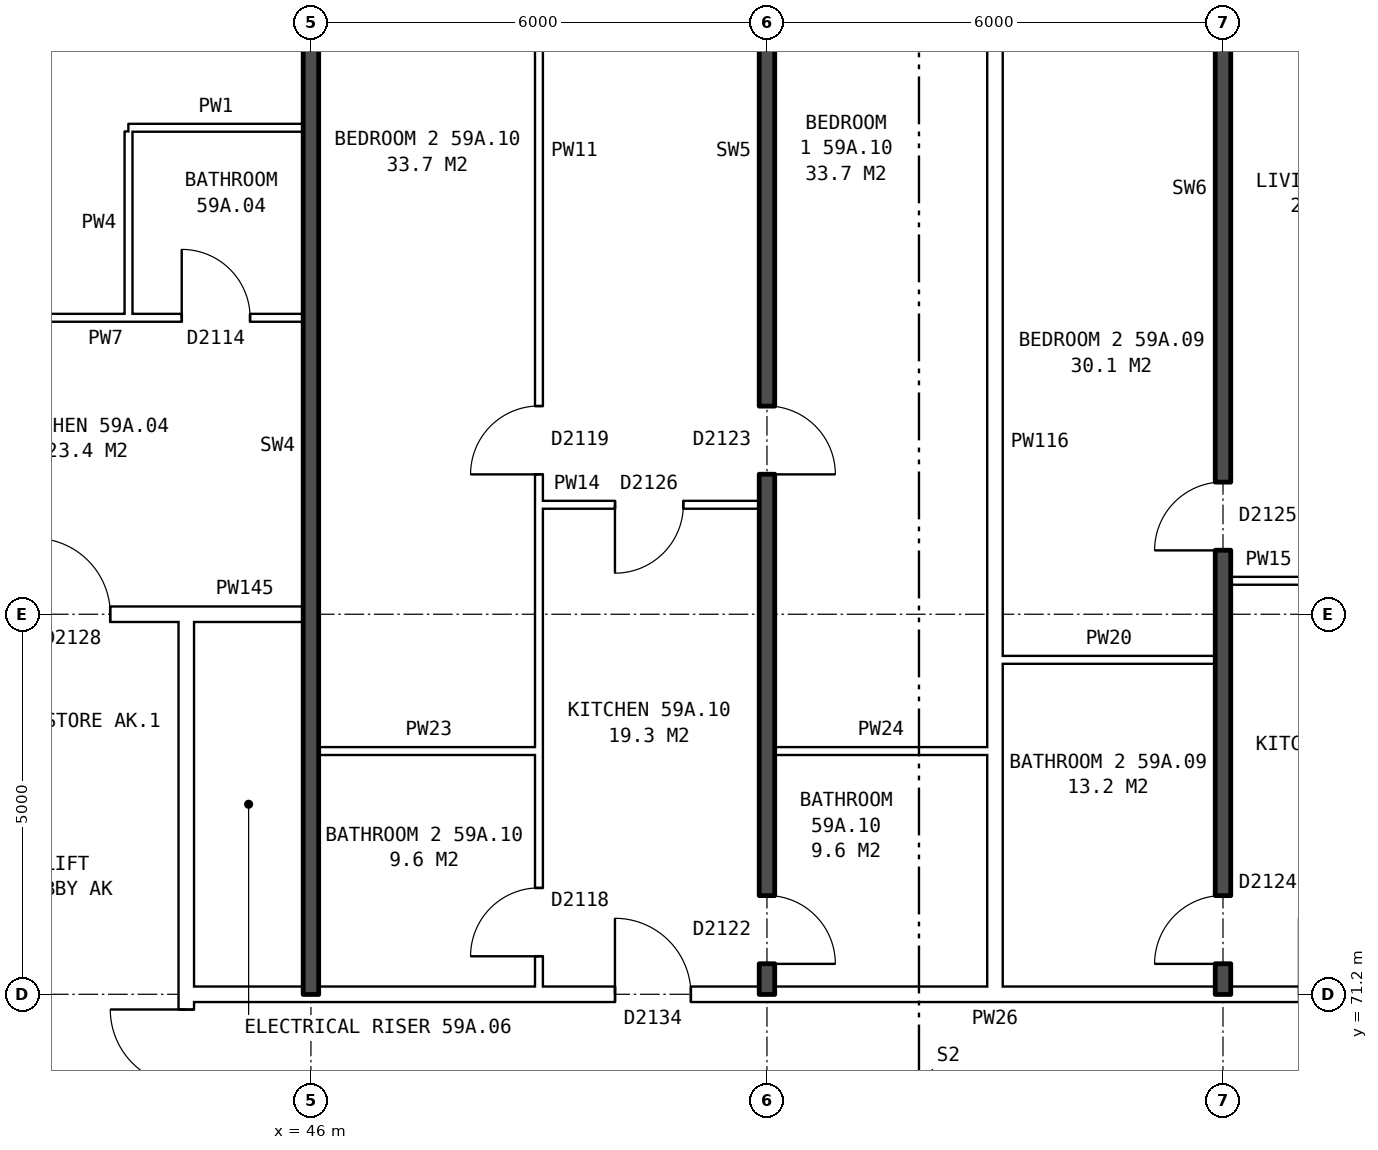
"""IFC4 building model, lengths in metres.
Left out: names, types, materials, properties, quantities, classifications, styles, units other than length and angle.
Written with IfcOpenShell. Run it as: python <this file> out.ifc"""

import sys

from ifc_helpers import new_model, si_unit, direction, frame, frame_2d, origin, place, context, subcontext, project, spatial, rectangle, extrude, element, fill, save


model = new_model("IFC4")
c1 = context("Model", 3, precision=1e-05, world=origin(), true_north=direction((0.0, 1.0)))
c2 = subcontext(c1, "Body", "Model", "MODEL_VIEW")
j1 = project(units=[si_unit("LENGTHUNIT", "METRE"), si_unit("PLANEANGLEUNIT", "RADIAN")], contexts=[c1])
p1 = place(None, origin())
s1 = spatial("IfcSite", under=j1, at=p1, CompositionType="ELEMENT")
p2 = place(p1, origin())
s2 = spatial("IfcBuilding", under=s1, at=p2, CompositionType="ELEMENT")
p3 = place(p2, frame((0.0, 0.0, 209.0)))
s3 = spatial("IfcBuildingStorey", under=s2, at=p3, CompositionType="ELEMENT", Elevation=209.0)
p4 = place(p3, frame((44.36, 63.9, 0.0), z_axis=(0.0, 0.0, 1.0), x_axis=(0.0, 1.0, 0.0)))
e1 = element("IfcWall", 1, at=p4, inside=s3, PredefinedType="PARTITIONING", context=c2, shape_type="SweptSolid", body=[
    extrude(rectangle(XDim=12.2, YDim=0.2, at=frame_2d((6.1, 0.0))), origin(), (0.0, 0.0, 1.0), 2.85),
])
p5 = place(p4, frame((5.1, 0.0, 0.0)))
e2 = element("IfcOpeningElement", 2, at=p5, cuts=e1, PredefinedType="OPENING", context=c2, shape_type="SweptSolid", body=[
    extrude(rectangle(XDim=2.0, YDim=2.1, at=frame_2d((1.0, 1.05))), frame((0.0, 0.11, 0.0), z_axis=(0.0, -1.0, 0.0), x_axis=(1.0, 0.0, 0.0)), (0.0, 0.0, 1.0), 0.22),
])
p6 = place(p3, frame((44.36, 71.2, 0.0), z_axis=(0.0, 0.0, 1.0), x_axis=(1.0, 0.0, 0.0)))
e3 = element("IfcWall", 3, at=p6, inside=s3, PredefinedType="PARTITIONING", context=c2, shape_type="SweptSolid", body=[
    extrude(rectangle(XDim=19.28, YDim=0.2, at=frame_2d((9.64, 0.0))), origin(), (0.0, 0.0, 1.0), 2.85),
])
p7 = place(p6, frame((14.64, 0.0, 0.0)))
e4 = element("IfcOpeningElement", 4, at=p7, cuts=e3, PredefinedType="OPENING", context=c2, shape_type="SweptSolid", body=[
    extrude(rectangle(XDim=1.0, YDim=2.1, at=frame_2d((0.5, 1.05))), frame((0.0, 0.11, 0.0), z_axis=(0.0, -1.0, 0.0), x_axis=(1.0, 0.0, 0.0)), (0.0, 0.0, 1.0), 0.22),
])
p8 = place(p6, frame((5.64, 0.0, 0.0)))
e5 = element("IfcOpeningElement", 5, at=p8, cuts=e3, PredefinedType="OPENING", context=c2, shape_type="SweptSolid", body=[
    extrude(rectangle(XDim=1.0, YDim=2.1, at=frame_2d((0.5, 1.05))), frame((0.0, 0.11, 0.0), z_axis=(0.0, -1.0, 0.0), x_axis=(1.0, 0.0, 0.0)), (0.0, 0.0, 1.0), 0.22),
])
p9 = place(p3, frame((46.1, 74.4, 0.0), z_axis=(0.0, 0.0, 1.0), x_axis=(1.0, 0.0, 0.0)))
e6 = element("IfcWall", 6, at=p9, inside=s3, PredefinedType="PARTITIONING", context=c2, shape_type="SweptSolid", body=[
    extrude(rectangle(XDim=2.9, YDim=0.1, at=frame_2d((1.45, 0.0))), origin(), (0.0, 0.0, 1.0), 2.85),
])
for number, where, z_axis, x_axis in (
    (7, (52.1, 74.4, 0.0), (0.0, 0.0, 1.0), (1.0, 0.0, 0.0)),
    (8, (55.1, 75.6, 0.0), (0.0, 0.0, 1.0), (1.0, 0.0, 0.0)),
):
    element("IfcWall", number, at=place(p3, frame(where, z_axis=z_axis, x_axis=x_axis)), inside=s3, PredefinedType="PARTITIONING", context=c2, shape_type="SweptSolid", body=[
        extrude(rectangle(XDim=2.8, YDim=0.1, at=frame_2d((1.4, 0.0))), origin(), (0.0, 0.0, 1.0), 2.85),
    ])
p10 = place(p3, frame((41.36, 76.2, 0.0), z_axis=(0.0, 0.0, 1.0), x_axis=(1.0, 0.0, 0.0)))
e9 = element("IfcWall", 9, at=p10, inside=s3, PredefinedType="PARTITIONING", context=c2, shape_type="SweptSolid", body=[
    extrude(rectangle(XDim=3.0, YDim=0.2, at=frame_2d((1.5, 0.0))), origin(), (0.0, 0.0, 1.0), 2.85),
])
p11 = place(p10, frame((1.0, 0.0, 0.0)))
e10 = element("IfcOpeningElement", 10, at=p11, cuts=e9, PredefinedType="OPENING", context=c2, shape_type="SweptSolid", body=[
    extrude(rectangle(XDim=1.0, YDim=2.1, at=frame_2d((0.5, 1.05))), frame((0.0, 0.11, 0.0), z_axis=(0.0, -1.0, 0.0), x_axis=(1.0, 0.0, 0.0)), (0.0, 0.0, 1.0), 0.22),
])
p12 = place(p3, frame((44.36, 76.2, 0.0), z_axis=(0.0, 0.0, 1.0), x_axis=(1.0, 0.0, 0.0)))
e11 = element("IfcWall", 11, at=p12, inside=s3, PredefinedType="PARTITIONING", context=c2, shape_type="SweptSolid", body=[
    extrude(rectangle(XDim=1.54, YDim=0.2, at=frame_2d((0.77, 0.0))), origin(), (0.0, 0.0, 1.0), 2.85),
])
p13 = place(p3, frame((58.1, 76.64, 0.0), z_axis=(0.0, 0.0, 1.0), x_axis=(1.0, 0.0, 0.0)))
e12 = element("IfcWall", 12, at=p13, inside=s3, PredefinedType="PARTITIONING", context=c2, shape_type="SweptSolid", body=[
    extrude(rectangle(XDim=2.9, YDim=0.1, at=frame_2d((1.45, 0.0))), origin(), (0.0, 0.0, 1.0), 2.85),
])
p14 = place(p13, frame((1.0, 0.0, 0.0)))
e13 = element("IfcOpeningElement", 13, at=p14, cuts=e12, PredefinedType="OPENING", context=c2, shape_type="SweptSolid", body=[
    extrude(rectangle(XDim=0.9, YDim=2.1, at=frame_2d((0.45, 1.05))), frame((0.0, 0.06, 0.0), z_axis=(0.0, -1.0, 0.0), x_axis=(1.0, 0.0, 0.0)), (0.0, 0.0, 1.0), 0.12),
])
p15 = place(p3, frame((49.0, 77.64, 0.0), z_axis=(0.0, 0.0, 1.0), x_axis=(1.0, 0.0, 0.0)))
e14 = element("IfcWall", 14, at=p15, inside=s3, PredefinedType="PARTITIONING", context=c2, shape_type="SweptSolid", body=[
    extrude(rectangle(XDim=2.9, YDim=0.1, at=frame_2d((1.45, 0.0))), origin(), (0.0, 0.0, 1.0), 2.85),
])
p16 = place(p15, frame((1.0, 0.0, 0.0)))
e15 = element("IfcOpeningElement", 15, at=p16, cuts=e14, PredefinedType="OPENING", context=c2, shape_type="SweptSolid", body=[
    extrude(rectangle(XDim=0.9, YDim=2.1, at=frame_2d((0.45, 1.05))), frame((0.0, 0.06, 0.0), z_axis=(0.0, -1.0, 0.0), x_axis=(1.0, 0.0, 0.0)), (0.0, 0.0, 1.0), 0.12),
])
p17 = place(p3, frame((40.1, 80.1, 0.0), z_axis=(0.0, 0.0, 1.0), x_axis=(1.0, 0.0, 0.0)))
e16 = element("IfcWall", 16, at=p17, inside=s3, PredefinedType="PARTITIONING", context=c2, shape_type="SweptSolid", body=[
    extrude(rectangle(XDim=5.8, YDim=0.1, at=frame_2d((2.9, 0.0))), origin(), (0.0, 0.0, 1.0), 2.85),
])
p18 = place(p17, frame((1.3, 0.0, 0.0)))
e17 = element("IfcOpeningElement", 17, at=p18, cuts=e16, PredefinedType="OPENING", context=c2, shape_type="SweptSolid", body=[
    extrude(rectangle(XDim=0.9, YDim=2.1, at=frame_2d((0.45, 1.05))), frame((0.0, 0.06, 0.0), z_axis=(0.0, -1.0, 0.0), x_axis=(1.0, 0.0, 0.0)), (0.0, 0.0, 1.0), 0.12),
])
p19 = place(p17, frame((4.2, 0.0, 0.0)))
e18 = element("IfcOpeningElement", 18, at=p19, cuts=e16, PredefinedType="OPENING", context=c2, shape_type="SweptSolid", body=[
    extrude(rectangle(XDim=0.9, YDim=2.1, at=frame_2d((0.45, 1.05))), frame((0.0, 0.06, 0.0), z_axis=(0.0, -1.0, 0.0), x_axis=(1.0, 0.0, 0.0)), (0.0, 0.0, 1.0), 0.12),
])
p20 = place(p3, frame((43.6, 82.6, 0.0), z_axis=(0.0, 0.0, 1.0), x_axis=(1.0, 0.0, 0.0)))
e19 = element("IfcWall", 19, at=p20, inside=s3, PredefinedType="PARTITIONING", context=c2, shape_type="SweptSolid", body=[
    extrude(rectangle(XDim=2.3, YDim=0.1, at=frame_2d((1.15, 0.0))), origin(), (0.0, 0.0, 1.0), 2.85),
])
p21 = place(p3, frame((43.6, 80.15, 0.0), z_axis=(0.0, 0.0, 1.0), x_axis=(0.0, 1.0, 0.0)))
e20 = element("IfcWall", 20, at=p21, inside=s3, PredefinedType="PARTITIONING", context=c2, shape_type="SweptSolid", body=[
    extrude(rectangle(XDim=2.4, YDim=0.1, at=frame_2d((1.2, 0.0))), origin(), (0.0, 0.0, 1.0), 2.85),
])
p22 = place(p3, frame((46.0, 71.2, 0.0), z_axis=(0.0, 0.0, 1.0), x_axis=(0.0, 1.0, 0.0)))
e21 = element("IfcWall", 21, at=p22, inside=s3, PredefinedType="SOLIDWALL", context=c2, shape_type="SweptSolid", body=[
    extrude(rectangle(XDim=14.44, YDim=0.2, at=frame_2d((7.22, 0.0))), origin(), (0.0, 0.0, 1.0), 2.85),
])
p23 = place(p3, frame((49.0, 71.3, 0.0), z_axis=(0.0, 0.0, 1.0), x_axis=(0.0, 1.0, 0.0)))
e22 = element("IfcWall", 22, at=p23, inside=s3, PredefinedType="PARTITIONING", context=c2, shape_type="SweptSolid", body=[
    extrude(rectangle(XDim=14.34, YDim=0.1, at=frame_2d((7.17, 0.0))), origin(), (0.0, 0.0, 1.0), 2.85),
])
p24 = place(p23, frame((6.74, 0.0, 0.0)))
e23 = element("IfcOpeningElement", 23, at=p24, cuts=e22, PredefinedType="OPENING", context=c2, shape_type="SweptSolid", body=[
    extrude(rectangle(XDim=0.9, YDim=2.1, at=frame_2d((0.45, 1.05))), frame((0.0, 0.06, 0.0), z_axis=(0.0, -1.0, 0.0), x_axis=(1.0, 0.0, 0.0)), (0.0, 0.0, 1.0), 0.12),
])
p25 = place(p23, frame((0.4, 0.0, 0.0)))
e24 = element("IfcOpeningElement", 24, at=p25, cuts=e22, PredefinedType="OPENING", context=c2, shape_type="SweptSolid", body=[
    extrude(rectangle(XDim=0.9, YDim=2.1, at=frame_2d((0.45, 1.05))), frame((0.0, 0.06, 0.0), z_axis=(0.0, -1.0, 0.0), x_axis=(1.0, 0.0, 0.0)), (0.0, 0.0, 1.0), 0.12),
])
p26 = place(p3, frame((52.0, 71.2, 0.0), z_axis=(0.0, 0.0, 1.0), x_axis=(0.0, 1.0, 0.0)))
e25 = element("IfcWall", 25, at=p26, inside=s3, PredefinedType="SOLIDWALL", context=c2, shape_type="SweptSolid", body=[
    extrude(rectangle(XDim=14.44, YDim=0.2, at=frame_2d((7.22, 0.0))), origin(), (0.0, 0.0, 1.0), 2.85),
])
p27 = place(p26, frame((6.84, 0.0, 0.0)))
e26 = element("IfcOpeningElement", 26, at=p27, cuts=e25, PredefinedType="OPENING", context=c2, shape_type="SweptSolid", body=[
    extrude(rectangle(XDim=0.9, YDim=2.1, at=frame_2d((0.45, 1.05))), frame((0.0, 0.11, 0.0), z_axis=(0.0, -1.0, 0.0), x_axis=(1.0, 0.0, 0.0)), (0.0, 0.0, 1.0), 0.22),
])
p28 = place(p26, frame((0.4, 0.0, 0.0)))
e27 = element("IfcOpeningElement", 27, at=p28, cuts=e25, PredefinedType="OPENING", context=c2, shape_type="SweptSolid", body=[
    extrude(rectangle(XDim=0.9, YDim=2.1, at=frame_2d((0.45, 1.05))), frame((0.0, 0.11, 0.0), z_axis=(0.0, -1.0, 0.0), x_axis=(1.0, 0.0, 0.0)), (0.0, 0.0, 1.0), 0.22),
])
p29 = place(p3, frame((55.0, 71.3, 0.0), z_axis=(0.0, 0.0, 1.0), x_axis=(0.0, 1.0, 0.0)))
e28 = element("IfcWall", 28, at=p29, inside=s3, PredefinedType="PARTITIONING", context=c2, shape_type="SweptSolid", body=[
    extrude(rectangle(XDim=14.34, YDim=0.2, at=frame_2d((7.17, 0.0))), origin(), (0.0, 0.0, 1.0), 2.85),
])
p30 = place(p3, frame((58.0, 71.2, 0.0), z_axis=(0.0, 0.0, 1.0), x_axis=(0.0, 1.0, 0.0)))
e29 = element("IfcWall", 29, at=p30, inside=s3, PredefinedType="SOLIDWALL", context=c2, shape_type="SweptSolid", body=[
    extrude(rectangle(XDim=14.44, YDim=0.2, at=frame_2d((7.22, 0.0))), origin(), (0.0, 0.0, 1.0), 2.85),
])
p31 = place(p30, frame((5.84, 0.0, 0.0)))
e30 = element("IfcOpeningElement", 30, at=p31, cuts=e29, PredefinedType="OPENING", context=c2, shape_type="SweptSolid", body=[
    extrude(rectangle(XDim=0.9, YDim=2.1, at=frame_2d((0.45, 1.05))), frame((0.0, 0.11, 0.0), z_axis=(0.0, -1.0, 0.0), x_axis=(1.0, 0.0, 0.0)), (0.0, 0.0, 1.0), 0.22),
])
p32 = place(p30, frame((0.4, 0.0, 0.0)))
e31 = element("IfcOpeningElement", 31, at=p32, cuts=e29, PredefinedType="OPENING", context=c2, shape_type="SweptSolid", body=[
    extrude(rectangle(XDim=0.9, YDim=2.1, at=frame_2d((0.45, 1.05))), frame((0.0, 0.11, 0.0), z_axis=(0.0, -1.0, 0.0), x_axis=(1.0, 0.0, 0.0)), (0.0, 0.0, 1.0), 0.22),
])
p33 = place(p5, origin())
e32 = element("IfcDoor", 32, at=p33, inside=s3, OperationType="DOUBLE_DOOR_SINGLE_SWING", PredefinedType="DOOR", context=c2, shape_type="SweptSolid", body=[
    extrude(rectangle(XDim=2.0, YDim=2.1, at=frame_2d((1.0, 1.05))), frame((0.0, 0.025, 0.0), z_axis=(0.0, -1.0, 0.0), x_axis=(1.0, 0.0, 0.0)), (0.0, 0.0, 1.0), 0.05),
])
fill(e2, e32)
p34 = place(p11, origin())
e33 = element("IfcDoor", 33, at=p34, inside=s3, OperationType="SINGLE_SWING_LEFT", PredefinedType="DOOR", context=c2, shape_type="SweptSolid", body=[
    extrude(rectangle(XDim=1.0, YDim=2.1, at=frame_2d((0.5, 1.05))), frame((0.0, 0.025, 0.0), z_axis=(0.0, -1.0, 0.0), x_axis=(1.0, 0.0, 0.0)), (0.0, 0.0, 1.0), 0.05),
])
fill(e10, e33)
p35 = place(p19, origin())
e34 = element("IfcDoor", 34, at=p35, inside=s3, OperationType="SINGLE_SWING_LEFT", PredefinedType="DOOR", context=c2, shape_type="SweptSolid", body=[
    extrude(rectangle(XDim=0.9, YDim=2.1, at=frame_2d((0.45, 1.05))), frame((0.0, 0.025, 0.0), z_axis=(0.0, -1.0, 0.0), x_axis=(1.0, 0.0, 0.0)), (0.0, 0.0, 1.0), 0.05),
])
fill(e18, e34)
p36 = place(p31, origin())
e35 = element("IfcDoor", 35, at=p36, inside=s3, OperationType="SINGLE_SWING_LEFT", PredefinedType="DOOR", context=c2, shape_type="SweptSolid", body=[
    extrude(rectangle(XDim=0.9, YDim=2.1, at=frame_2d((0.45, 1.05))), frame((0.0, 0.025, 0.0), z_axis=(0.0, -1.0, 0.0), x_axis=(1.0, 0.0, 0.0)), (0.0, 0.0, 1.0), 0.05),
])
fill(e30, e35)
p37 = place(p32, origin())
e36 = element("IfcDoor", 36, at=p37, inside=s3, OperationType="SINGLE_SWING_LEFT", PredefinedType="DOOR", context=c2, shape_type="SweptSolid", body=[
    extrude(rectangle(XDim=0.9, YDim=2.1, at=frame_2d((0.45, 1.05))), frame((0.0, 0.025, 0.0), z_axis=(0.0, -1.0, 0.0), x_axis=(1.0, 0.0, 0.0)), (0.0, 0.0, 1.0), 0.05),
])
fill(e31, e36)
p38 = place(p27, frame((0.9, 0.0, 0.0), z_axis=(0.0, 0.0, 1.0), x_axis=(-1.0, 0.0, 0.0)))
e37 = element("IfcDoor", 37, at=p38, inside=s3, OperationType="SINGLE_SWING_RIGHT", PredefinedType="DOOR", context=c2, shape_type="SweptSolid", body=[
    extrude(rectangle(XDim=0.9, YDim=2.1, at=frame_2d((0.45, 1.05))), frame((0.0, 0.025, 0.0), z_axis=(0.0, -1.0, 0.0), x_axis=(1.0, 0.0, 0.0)), (0.0, 0.0, 1.0), 0.05),
])
fill(e26, e37)
p39 = place(p24, origin())
e38 = element("IfcDoor", 38, at=p39, inside=s3, OperationType="SINGLE_SWING_LEFT", PredefinedType="DOOR", context=c2, shape_type="SweptSolid", body=[
    extrude(rectangle(XDim=0.9, YDim=2.1, at=frame_2d((0.45, 1.05))), frame((0.0, 0.025, 0.0), z_axis=(0.0, -1.0, 0.0), x_axis=(1.0, 0.0, 0.0)), (0.0, 0.0, 1.0), 0.05),
])
fill(e23, e38)
p40 = place(p8, origin())
e39 = element("IfcDoor", 39, at=p40, inside=s3, OperationType="SINGLE_SWING_LEFT", PredefinedType="DOOR", context=c2, shape_type="SweptSolid", body=[
    extrude(rectangle(XDim=1.0, YDim=2.1, at=frame_2d((0.5, 1.05))), frame((0.0, 0.025, 0.0), z_axis=(0.0, -1.0, 0.0), x_axis=(1.0, 0.0, 0.0)), (0.0, 0.0, 1.0), 0.05),
])
fill(e5, e39)
p41 = place(p16, frame((0.9, 0.0, 0.0), z_axis=(0.0, 0.0, 1.0), x_axis=(-1.0, 0.0, 0.0)))
e40 = element("IfcDoor", 40, at=p41, inside=s3, OperationType="SINGLE_SWING_RIGHT", PredefinedType="DOOR", context=c2, shape_type="SweptSolid", body=[
    extrude(rectangle(XDim=0.9, YDim=2.1, at=frame_2d((0.45, 1.05))), frame((0.0, 0.025, 0.0), z_axis=(0.0, -1.0, 0.0), x_axis=(1.0, 0.0, 0.0)), (0.0, 0.0, 1.0), 0.05),
])
fill(e15, e40)
p42 = place(p28, frame((0.9, 0.0, 0.0), z_axis=(0.0, 0.0, 1.0), x_axis=(-1.0, 0.0, 0.0)))
e41 = element("IfcDoor", 41, at=p42, inside=s3, OperationType="SINGLE_SWING_RIGHT", PredefinedType="DOOR", context=c2, shape_type="SweptSolid", body=[
    extrude(rectangle(XDim=0.9, YDim=2.1, at=frame_2d((0.45, 1.05))), frame((0.0, 0.025, 0.0), z_axis=(0.0, -1.0, 0.0), x_axis=(1.0, 0.0, 0.0)), (0.0, 0.0, 1.0), 0.05),
])
fill(e27, e41)
p43 = place(p25, origin())
e42 = element("IfcDoor", 42, at=p43, inside=s3, OperationType="SINGLE_SWING_LEFT", PredefinedType="DOOR", context=c2, shape_type="SweptSolid", body=[
    extrude(rectangle(XDim=0.9, YDim=2.1, at=frame_2d((0.45, 1.05))), frame((0.0, 0.025, 0.0), z_axis=(0.0, -1.0, 0.0), x_axis=(1.0, 0.0, 0.0)), (0.0, 0.0, 1.0), 0.05),
])
fill(e24, e42)
save(model, sys.argv[1])
